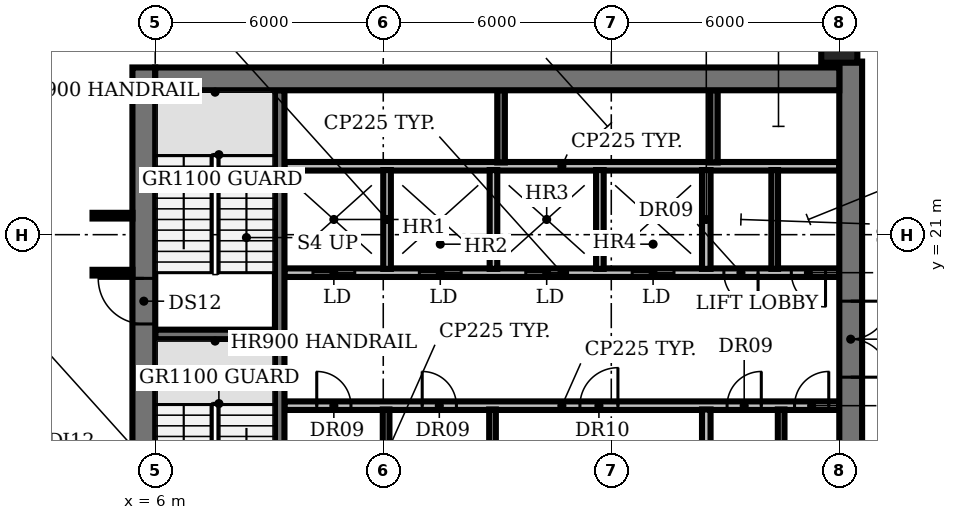
"""IFC4 building model, lengths in metres.
Left out: names, types, materials, properties, quantities, classifications, styles, units other than length and angle.
Written with IfcOpenShell. Run it as: python <this file> out.ifc"""

import sys

from ifc_helpers import new_model, si_unit, direction, frame, frame_2d, origin, origin_2d, place, context, subcontext, project, spatial, rectangle, circle, extrude, element, fill, save


model = new_model("IFC4")
c1 = context("Model", 3, precision=1e-05, world=origin(), true_north=direction((0.0, 1.0)))
c2 = subcontext(c1, "Body", "Model", "MODEL_VIEW")
j1 = project(units=[si_unit("LENGTHUNIT", "METRE"), si_unit("PLANEANGLEUNIT", "RADIAN")], contexts=[c1])
p1 = place(None, origin())
s1 = spatial("IfcSite", under=j1, at=p1, CompositionType="ELEMENT")
p2 = place(p1, origin())
s2 = spatial("IfcBuilding", under=s1, at=p2, CompositionType="ELEMENT")
p3 = place(p2, frame((0.0, 0.0, 159.2)))
s3 = spatial("IfcBuildingStorey", under=s2, at=p3, CompositionType="ELEMENT", Elevation=159.2)
p4 = place(p3, frame((24.0, 26.0, 0.0), z_axis=(0.0, 0.0, 1.0), x_axis=(1.0, 0.0, 0.0)))
e1 = element("IfcColumn", 1, at=p4, inside=s3, PredefinedType="COLUMN", context=c2, shape_type="SweptSolid", body=[
    extrude(circle(Radius=0.475, at=origin_2d()), origin(), (0.0, 0.0, 1.0), 3.85),
])
p5 = place(p3, frame((9.4, 16.5, 0.0), z_axis=(0.0, 0.0, 1.0), x_axis=(1.0, 0.0, 0.0)))
e2 = element("IfcWall", 2, at=p5, inside=s3, PredefinedType="PARTITIONING", context=c2, shape_type="SweptSolid", body=[
    extrude(rectangle(XDim=14.6, YDim=0.225, at=frame_2d((7.3, 0.0))), origin(), (0.0, 0.0, 1.0), 3.85),
])
p6 = place(p5, frame((0.85, 0.0, 0.0)))
e3 = element("IfcOpeningElement", 3, at=p6, cuts=e2, PredefinedType="OPENING", context=c2, shape_type="SweptSolid", body=[
    extrude(rectangle(XDim=0.9, YDim=2.1, at=frame_2d((0.45, 1.05))), frame((0.0, 0.123, 0.0), z_axis=(0.0, -1.0, 0.0), x_axis=(1.0, 0.0, 0.0)), (0.0, 0.0, 1.0), 0.245),
])
p7 = place(p5, frame((3.625, 0.0, 0.0)))
e4 = element("IfcOpeningElement", 4, at=p7, cuts=e2, PredefinedType="OPENING", context=c2, shape_type="SweptSolid", body=[
    extrude(rectangle(XDim=0.9, YDim=2.1, at=frame_2d((0.45, 1.05))), frame((0.0, 0.123, 0.0), z_axis=(0.0, -1.0, 0.0), x_axis=(1.0, 0.0, 0.0)), (0.0, 0.0, 1.0), 0.245),
])
p8 = place(p5, frame((7.775, 0.0, 0.0)))
e5 = element("IfcOpeningElement", 5, at=p8, cuts=e2, PredefinedType="OPENING", context=c2, shape_type="SweptSolid", body=[
    extrude(rectangle(XDim=1.0, YDim=2.1, at=frame_2d((0.5, 1.05))), frame((0.0, 0.123, 0.0), z_axis=(0.0, -1.0, 0.0), x_axis=(1.0, 0.0, 0.0)), (0.0, 0.0, 1.0), 0.245),
])
p9 = place(p5, frame((11.647, 0.0, 0.0)))
e6 = element("IfcOpeningElement", 6, at=p9, cuts=e2, PredefinedType="OPENING", context=c2, shape_type="SweptSolid", body=[
    extrude(rectangle(XDim=0.9, YDim=2.1, at=frame_2d((0.45, 1.05))), frame((0.0, 0.123, 0.0), z_axis=(0.0, -1.0, 0.0), x_axis=(1.0, 0.0, 0.0)), (0.0, 0.0, 1.0), 0.245),
])
p10 = place(p5, frame((13.423, 0.0, 0.0)))
e7 = element("IfcOpeningElement", 7, at=p10, cuts=e2, PredefinedType="OPENING", context=c2, shape_type="SweptSolid", body=[
    extrude(rectangle(XDim=0.9, YDim=2.1, at=frame_2d((0.45, 1.05))), frame((0.0, 0.123, 0.0), z_axis=(0.0, -1.0, 0.0), x_axis=(1.0, 0.0, 0.0)), (0.0, 0.0, 1.0), 0.245),
])
p11 = place(p3, frame((6.0, 18.375, 0.0), z_axis=(0.0, 0.0, 1.0), x_axis=(1.0, 0.0, 0.0)))
e8 = element("IfcWall", 8, at=p11, inside=s3, PredefinedType="SHEAR", context=c2, shape_type="SweptSolid", body=[
    extrude(rectangle(XDim=3.15, YDim=0.25, at=frame_2d((1.575, 0.0))), origin(), (0.0, 0.0, 1.0), 3.85),
])
p12 = place(p3, frame((24.0, 20.0, 0.0), z_axis=(0.0, 0.0, 1.0), x_axis=(-1.0, 0.0, 0.0)))
e9 = element("IfcWall", 9, at=p12, inside=s3, PredefinedType="PARTITIONING", context=c2, shape_type="SweptSolid", body=[
    extrude(rectangle(XDim=14.6, YDim=0.225, at=frame_2d((7.3, 0.0))), origin(), (0.0, 0.0, 1.0), 3.85),
])
p13 = place(p12, frame((12.75, 0.0, 0.0)))
e10 = element("IfcOpeningElement", 10, at=p13, cuts=e9, PredefinedType="OPENING", context=c2, shape_type="SweptSolid", body=[
    extrude(rectangle(XDim=1.1, YDim=2.1, at=frame_2d((0.55, 1.05))), frame((0.0, 0.123, 0.0), z_axis=(0.0, -1.0, 0.0), x_axis=(1.0, 0.0, 0.0)), (0.0, 0.0, 1.0), 0.245),
])
p14 = place(p12, frame((9.95, 0.0, 0.0)))
e11 = element("IfcOpeningElement", 11, at=p14, cuts=e9, PredefinedType="OPENING", context=c2, shape_type="SweptSolid", body=[
    extrude(rectangle(XDim=1.1, YDim=2.1, at=frame_2d((0.55, 1.05))), frame((0.0, 0.123, 0.0), z_axis=(0.0, -1.0, 0.0), x_axis=(1.0, 0.0, 0.0)), (0.0, 0.0, 1.0), 0.245),
])
p15 = place(p12, frame((7.15, 0.0, 0.0)))
e12 = element("IfcOpeningElement", 12, at=p15, cuts=e9, PredefinedType="OPENING", context=c2, shape_type="SweptSolid", body=[
    extrude(rectangle(XDim=1.1, YDim=2.1, at=frame_2d((0.55, 1.05))), frame((0.0, 0.123, 0.0), z_axis=(0.0, -1.0, 0.0), x_axis=(1.0, 0.0, 0.0)), (0.0, 0.0, 1.0), 0.245),
])
p16 = place(p12, frame((4.35, 0.0, 0.0)))
e13 = element("IfcOpeningElement", 13, at=p16, cuts=e9, PredefinedType="OPENING", context=c2, shape_type="SweptSolid", body=[
    extrude(rectangle(XDim=1.1, YDim=2.1, at=frame_2d((0.55, 1.05))), frame((0.0, 0.123, 0.0), z_axis=(0.0, -1.0, 0.0), x_axis=(1.0, 0.0, 0.0)), (0.0, 0.0, 1.0), 0.245),
])
p17 = place(p12, frame((2.137, 0.0, 0.0)))
e14 = element("IfcOpeningElement", 14, at=p17, cuts=e9, PredefinedType="OPENING", context=c2, shape_type="SweptSolid", body=[
    extrude(rectangle(XDim=0.9, YDim=2.1, at=frame_2d((0.45, 1.05))), frame((0.0, 0.123, 0.0), z_axis=(0.0, -1.0, 0.0), x_axis=(1.0, 0.0, 0.0)), (0.0, 0.0, 1.0), 0.245),
])
p18 = place(p12, frame((0.363, 0.0, 0.0)))
e15 = element("IfcOpeningElement", 15, at=p18, cuts=e9, PredefinedType="OPENING", context=c2, shape_type="SweptSolid", body=[
    extrude(rectangle(XDim=0.9, YDim=2.1, at=frame_2d((0.45, 1.05))), frame((0.0, 0.123, 0.0), z_axis=(0.0, -1.0, 0.0), x_axis=(1.0, 0.0, 0.0)), (0.0, 0.0, 1.0), 0.245),
])
p19 = place(p3, frame((9.4, 22.8, 0.0), z_axis=(0.0, 0.0, 1.0), x_axis=(1.0, 0.0, 0.0)))
e16 = element("IfcWall", 16, at=p19, inside=s3, PredefinedType="PARTITIONING", context=c2, shape_type="SweptSolid", body=[
    extrude(rectangle(XDim=14.6, YDim=0.225, at=frame_2d((7.3, 0.0))), origin(), (0.0, 0.0, 1.0), 3.85),
])
p20 = place(p3, frame((9.275, 18.375, 0.0), z_axis=(0.0, 0.0, 1.0), x_axis=(0.0, -1.0, 0.0)))
e17 = element("IfcWall", 17, at=p20, inside=s3, PredefinedType="SHEAR", context=c2, shape_type="SweptSolid", body=[
    extrude(rectangle(XDim=6.55, YDim=0.25, at=frame_2d((3.275, 0.0))), origin(), (0.0, 0.0, 1.0), 3.85),
])
p21 = place(p20, frame((5.075, 0.0, 0.0)))
e18 = element("IfcOpeningElement", 18, at=p21, cuts=e17, PredefinedType="OPENING", context=c2, shape_type="SweptSolid", body=[
    extrude(rectangle(XDim=1.0, YDim=2.1, at=frame_2d((0.5, 1.05))), frame((0.0, 0.135, 0.0), z_axis=(0.0, -1.0, 0.0), x_axis=(1.0, 0.0, 0.0)), (0.0, 0.0, 1.0), 0.27),
])
p22 = place(p3, frame((9.275, 18.375, 0.0), z_axis=(0.0, 0.0, 1.0), x_axis=(0.0, 1.0, 0.0)))
e19 = element("IfcWall", 19, at=p22, inside=s3, PredefinedType="SHEAR", context=c2, shape_type="SweptSolid", body=[
    extrude(rectangle(XDim=6.425, YDim=0.25, at=frame_2d((3.212, 0.0))), origin(), (0.0, 0.0, 1.0), 3.85),
])
p23 = place(p3, frame((12.075, 13.8, 0.0), z_axis=(0.0, 0.0, 1.0), x_axis=(0.0, 1.0, 0.0)))
e20 = element("IfcWall", 20, at=p23, inside=s3, PredefinedType="PARTITIONING", context=c2, shape_type="SweptSolid", body=[
    extrude(rectangle(XDim=2.6, YDim=0.175, at=frame_2d((1.3, 0.0))), origin(), (0.0, 0.0, 1.0), 3.85),
])
p24 = place(p3, frame((12.1, 20.1, 0.0), z_axis=(0.0, 0.0, 1.0), x_axis=(0.0, 1.0, 0.0)))
e21 = element("IfcWall", 21, at=p24, inside=s3, PredefinedType="SOLIDWALL", context=c2, shape_type="SweptSolid", body=[
    extrude(rectangle(XDim=2.6, YDim=0.2, at=frame_2d((1.3, 0.0))), origin(), (0.0, 0.0, 1.0), 3.85),
])
p25 = place(p3, frame((14.875, 13.8, 0.0), z_axis=(0.0, 0.0, 1.0), x_axis=(0.0, 1.0, 0.0)))
e22 = element("IfcWall", 22, at=p25, inside=s3, PredefinedType="PARTITIONING", context=c2, shape_type="SweptSolid", body=[
    extrude(rectangle(XDim=2.6, YDim=0.175, at=frame_2d((1.3, 0.0))), origin(), (0.0, 0.0, 1.0), 3.85),
])
p26 = place(p3, frame((14.9, 20.1, 0.0), z_axis=(0.0, 0.0, 1.0), x_axis=(0.0, 1.0, 0.0)))
e23 = element("IfcWall", 23, at=p26, inside=s3, PredefinedType="SOLIDWALL", context=c2, shape_type="SweptSolid", body=[
    extrude(rectangle(XDim=2.6, YDim=0.2, at=frame_2d((1.3, 0.0))), origin(), (0.0, 0.0, 1.0), 3.85),
])
p27 = place(p3, frame((15.1, 22.9, 0.0), z_axis=(0.0, 0.0, 1.0), x_axis=(0.0, 1.0, 0.0)))
e24 = element("IfcWall", 24, at=p27, inside=s3, PredefinedType="SHEAR", context=c2, shape_type="SweptSolid", body=[
    extrude(rectangle(XDim=1.9, YDim=0.2, at=frame_2d((0.95, 0.0))), origin(), (0.0, 0.0, 1.0), 3.85),
])
p28 = place(p3, frame((17.7, 20.1, 0.0), z_axis=(0.0, 0.0, 1.0), x_axis=(0.0, 1.0, 0.0)))
e25 = element("IfcWall", 25, at=p28, inside=s3, PredefinedType="SOLIDWALL", context=c2, shape_type="SweptSolid", body=[
    extrude(rectangle(XDim=2.6, YDim=0.2, at=frame_2d((1.3, 0.0))), origin(), (0.0, 0.0, 1.0), 3.85),
])
for number, where, z_axis, x_axis in (
    (26, (20.5, 13.8, 0.0), (0.0, 0.0, 1.0), (0.0, 1.0, 0.0)),
    (27, (20.5, 20.1, 0.0), (0.0, 0.0, 1.0), (0.0, 1.0, 0.0)),
):
    element("IfcWall", number, at=place(p3, frame(where, z_axis=z_axis, x_axis=x_axis)), inside=s3, PredefinedType="PARTITIONING", context=c2, shape_type="SweptSolid", body=[
        extrude(rectangle(XDim=2.6, YDim=0.225, at=frame_2d((1.3, 0.0))), origin(), (0.0, 0.0, 1.0), 3.85),
    ])
p29 = place(p3, frame((20.7, 22.9, 0.0), z_axis=(0.0, 0.0, 1.0), x_axis=(0.0, 1.0, 0.0)))
e28 = element("IfcWall", 28, at=p29, inside=s3, PredefinedType="SHEAR", context=c2, shape_type="SweptSolid", body=[
    extrude(rectangle(XDim=1.9, YDim=0.2, at=frame_2d((0.95, 0.0))), origin(), (0.0, 0.0, 1.0), 3.85),
])
for number, where, z_axis, x_axis in (
    (29, (22.3, 20.1, 0.0), (0.0, 0.0, 1.0), (0.0, 1.0, 0.0)),
    (30, (22.47, 13.8, 0.0), (0.0, 0.0, 1.0), (0.0, 1.0, 0.0)),
):
    element("IfcWall", number, at=place(p3, frame(where, z_axis=z_axis, x_axis=x_axis)), inside=s3, PredefinedType="PARTITIONING", context=c2, shape_type="SweptSolid", body=[
        extrude(rectangle(XDim=2.6, YDim=0.175, at=frame_2d((1.3, 0.0))), origin(), (0.0, 0.0, 1.0), 3.85),
    ])
p30 = place(p3, frame((5.7, 4.8, 0.0), z_axis=(0.0, 0.0, 1.0), x_axis=(0.0, 1.0, 0.0)))
e31 = element("IfcWall", 31, at=p30, inside=s3, PredefinedType="SHEAR", context=c2, shape_type="SweptSolid", body=[
    extrude(rectangle(XDim=20.6, YDim=0.6, at=frame_2d((10.3, 0.0))), origin(), (0.0, 0.0, 1.0), 3.85),
])
p31 = place(p30, frame((0.85, 0.0, 0.0)))
e32 = element("IfcOpeningElement", 32, at=p31, cuts=e31, PredefinedType="OPENING", context=c2, shape_type="SweptSolid", body=[
    extrude(rectangle(XDim=1.5, YDim=2.1, at=frame_2d((0.75, 1.05))), frame((0.0, 0.31, 0.0), z_axis=(0.0, -1.0, 0.0), x_axis=(1.0, 0.0, 0.0)), (0.0, 0.0, 1.0), 0.62),
])
p32 = place(p30, frame((7.3, 0.0, 0.0)))
e33 = element("IfcOpeningElement", 33, at=p32, cuts=e31, PredefinedType="OPENING", context=c2, shape_type="SweptSolid", body=[
    extrude(rectangle(XDim=1.2, YDim=2.1, at=frame_2d((0.6, 1.05))), frame((0.0, 0.31, 0.0), z_axis=(0.0, -1.0, 0.0), x_axis=(1.0, 0.0, 0.0)), (0.0, 0.0, 1.0), 0.62),
])
p33 = place(p30, frame((13.85, 0.0, 0.0)))
e34 = element("IfcOpeningElement", 34, at=p33, cuts=e31, PredefinedType="OPENING", context=c2, shape_type="SweptSolid", body=[
    extrude(rectangle(XDim=1.2, YDim=2.1, at=frame_2d((0.6, 1.05))), frame((0.0, 0.31, 0.0), z_axis=(0.0, -1.0, 0.0), x_axis=(1.0, 0.0, 0.0)), (0.0, 0.0, 1.0), 0.62),
])
p34 = place(p3, frame((24.3, 25.555, 0.0), z_axis=(0.0, 0.0, 1.0), x_axis=(0.0, -1.0, 0.0)))
e35 = element("IfcWall", 35, at=p34, inside=s3, PredefinedType="SHEAR", context=c2, shape_type="SweptSolid", body=[
    extrude(rectangle(XDim=20.755, YDim=0.6, at=frame_2d((10.377, 0.0))), origin(), (0.0, 0.0, 1.0), 3.85),
])
p35 = place(p34, frame((18.405, 0.0, 0.0)))
e36 = element("IfcOpeningElement", 36, at=p35, cuts=e35, PredefinedType="OPENING", context=c2, shape_type="SweptSolid", body=[
    extrude(rectangle(XDim=1.5, YDim=2.1, at=frame_2d((0.75, 1.05))), frame((0.0, 0.31, 0.0), z_axis=(0.0, -1.0, 0.0), x_axis=(1.0, 0.0, 0.0)), (0.0, 0.0, 1.0), 0.62),
])
p36 = place(p34, frame((12.305, 0.0, 0.0)))
e37 = element("IfcOpeningElement", 37, at=p36, cuts=e35, PredefinedType="OPENING", context=c2, shape_type="SweptSolid", body=[
    extrude(rectangle(XDim=0.9, YDim=2.1, at=frame_2d((0.45, 1.05))), frame((0.0, 0.31, 0.0), z_axis=(0.0, -1.0, 0.0), x_axis=(1.0, 0.0, 0.0)), (0.0, 0.0, 1.0), 0.62),
])
p37 = place(p34, frame((6.305, 0.0, 0.0)))
e38 = element("IfcOpeningElement", 38, at=p37, cuts=e35, PredefinedType="OPENING", context=c2, shape_type="SweptSolid", body=[
    extrude(rectangle(XDim=2.0, YDim=2.1, at=frame_2d((1.0, 1.05))), frame((0.0, 0.31, 0.0), z_axis=(0.0, -1.0, 0.0), x_axis=(1.0, 0.0, 0.0)), (0.0, 0.0, 1.0), 0.62),
])
p38 = place(p3, frame((6.0, 25.1, 0.0), z_axis=(0.0, 0.0, 1.0), x_axis=(1.0, 0.0, 0.0)))
e39 = element("IfcWall", 39, at=p38, inside=s3, PredefinedType="SHEAR", context=c2, shape_type="SweptSolid", body=[
    extrude(rectangle(XDim=18.0, YDim=0.6, at=frame_2d((9.0, 0.0))), origin(), (0.0, 0.0, 1.0), 3.85),
])
for number, where, z_axis, x_axis in (
    (40, (4.35, 20.0, 0.0), (0.0, 0.0, 1.0), (1.0, 0.0, 0.0)),
    (41, (4.35, 21.5, 0.0), (0.0, 0.0, 1.0), (1.0, 0.0, 0.0)),
):
    element("IfcWall", number, at=place(p3, frame(where, z_axis=z_axis, x_axis=x_axis)), inside=s3, PredefinedType="PARTITIONING", context=c2, shape_type="SweptSolid", body=[
        extrude(rectangle(XDim=1.05, YDim=0.15, at=frame_2d((0.525, 0.0))), origin(), (0.0, 0.0, 1.0), 2.88),
    ])
p39 = place(p6, origin())
e42 = element("IfcDoor", 42, at=p39, inside=s3, OperationType="SINGLE_SWING_LEFT", PredefinedType="DOOR", context=c2, shape_type="SweptSolid", body=[
    extrude(rectangle(XDim=0.9, YDim=2.1, at=frame_2d((0.45, 1.05))), frame((0.0, 0.025, 0.0), z_axis=(0.0, -1.0, 0.0), x_axis=(1.0, 0.0, 0.0)), (0.0, 0.0, 1.0), 0.05),
])
fill(e3, e42)
p40 = place(p7, origin())
e43 = element("IfcDoor", 43, at=p40, inside=s3, OperationType="SINGLE_SWING_LEFT", PredefinedType="DOOR", context=c2, shape_type="SweptSolid", body=[
    extrude(rectangle(XDim=0.9, YDim=2.1, at=frame_2d((0.45, 1.05))), frame((0.0, 0.025, 0.0), z_axis=(0.0, -1.0, 0.0), x_axis=(1.0, 0.0, 0.0)), (0.0, 0.0, 1.0), 0.05),
])
fill(e4, e43)
p41 = place(p8, origin())
e44 = element("IfcDoor", 44, at=p41, inside=s3, OperationType="SINGLE_SWING_RIGHT", PredefinedType="DOOR", context=c2, shape_type="SweptSolid", body=[
    extrude(rectangle(XDim=1.0, YDim=2.1, at=frame_2d((0.5, 1.05))), frame((0.0, 0.025, 0.0), z_axis=(0.0, -1.0, 0.0), x_axis=(1.0, 0.0, 0.0)), (0.0, 0.0, 1.0), 0.05),
])
fill(e5, e44)
p42 = place(p9, origin())
e45 = element("IfcDoor", 45, at=p42, inside=s3, OperationType="SINGLE_SWING_RIGHT", PredefinedType="DOOR", context=c2, shape_type="SweptSolid", body=[
    extrude(rectangle(XDim=0.9, YDim=2.1, at=frame_2d((0.45, 1.05))), frame((0.0, 0.025, 0.0), z_axis=(0.0, -1.0, 0.0), x_axis=(1.0, 0.0, 0.0)), (0.0, 0.0, 1.0), 0.05),
])
fill(e6, e45)
p43 = place(p10, origin())
e46 = element("IfcDoor", 46, at=p43, inside=s3, OperationType="SINGLE_SWING_RIGHT", PredefinedType="DOOR", context=c2, shape_type="SweptSolid", body=[
    extrude(rectangle(XDim=0.9, YDim=2.1, at=frame_2d((0.45, 1.05))), frame((0.0, 0.025, 0.0), z_axis=(0.0, -1.0, 0.0), x_axis=(1.0, 0.0, 0.0)), (0.0, 0.0, 1.0), 0.05),
])
fill(e7, e46)
p44 = place(p13, origin())
e47 = element("IfcDoor", 47, at=p44, inside=s3, OperationType="DOUBLE_DOOR_SLIDING", PredefinedType="DOOR", context=c2, shape_type="SweptSolid", body=[
    extrude(rectangle(XDim=1.1, YDim=2.1, at=frame_2d((0.55, 1.05))), frame((0.0, 0.025, 0.0), z_axis=(0.0, -1.0, 0.0), x_axis=(1.0, 0.0, 0.0)), (0.0, 0.0, 1.0), 0.05),
])
fill(e10, e47)
p45 = place(p14, origin())
e48 = element("IfcDoor", 48, at=p45, inside=s3, OperationType="DOUBLE_DOOR_SLIDING", PredefinedType="DOOR", context=c2, shape_type="SweptSolid", body=[
    extrude(rectangle(XDim=1.1, YDim=2.1, at=frame_2d((0.55, 1.05))), frame((0.0, 0.025, 0.0), z_axis=(0.0, -1.0, 0.0), x_axis=(1.0, 0.0, 0.0)), (0.0, 0.0, 1.0), 0.05),
])
fill(e11, e48)
p46 = place(p15, origin())
e49 = element("IfcDoor", 49, at=p46, inside=s3, OperationType="DOUBLE_DOOR_SLIDING", PredefinedType="DOOR", context=c2, shape_type="SweptSolid", body=[
    extrude(rectangle(XDim=1.1, YDim=2.1, at=frame_2d((0.55, 1.05))), frame((0.0, 0.025, 0.0), z_axis=(0.0, -1.0, 0.0), x_axis=(1.0, 0.0, 0.0)), (0.0, 0.0, 1.0), 0.05),
])
fill(e12, e49)
p47 = place(p16, origin())
e50 = element("IfcDoor", 50, at=p47, inside=s3, OperationType="DOUBLE_DOOR_SLIDING", PredefinedType="DOOR", context=c2, shape_type="SweptSolid", body=[
    extrude(rectangle(XDim=1.1, YDim=2.1, at=frame_2d((0.55, 1.05))), frame((0.0, 0.025, 0.0), z_axis=(0.0, -1.0, 0.0), x_axis=(1.0, 0.0, 0.0)), (0.0, 0.0, 1.0), 0.05),
])
fill(e13, e50)
p48 = place(p17, origin())
e51 = element("IfcDoor", 51, at=p48, inside=s3, OperationType="SINGLE_SWING_LEFT", PredefinedType="DOOR", context=c2, shape_type="SweptSolid", body=[
    extrude(rectangle(XDim=0.9, YDim=2.1, at=frame_2d((0.45, 1.05))), frame((0.0, 0.025, 0.0), z_axis=(0.0, -1.0, 0.0), x_axis=(1.0, 0.0, 0.0)), (0.0, 0.0, 1.0), 0.05),
])
fill(e14, e51)
p49 = place(p18, origin())
e52 = element("IfcDoor", 52, at=p49, inside=s3, OperationType="SINGLE_SWING_LEFT", PredefinedType="DOOR", context=c2, shape_type="SweptSolid", body=[
    extrude(rectangle(XDim=0.9, YDim=2.1, at=frame_2d((0.45, 1.05))), frame((0.0, 0.025, 0.0), z_axis=(0.0, -1.0, 0.0), x_axis=(1.0, 0.0, 0.0)), (0.0, 0.0, 1.0), 0.05),
])
fill(e15, e52)
p50 = place(p33, origin())
e53 = element("IfcDoor", 53, at=p50, inside=s3, OperationType="SINGLE_SWING_RIGHT", PredefinedType="DOOR", context=c2, shape_type="SweptSolid", body=[
    extrude(rectangle(XDim=1.2, YDim=2.1, at=frame_2d((0.6, 1.05))), frame((0.0, 0.025, 0.0), z_axis=(0.0, -1.0, 0.0), x_axis=(1.0, 0.0, 0.0)), (0.0, 0.0, 1.0), 0.05),
])
fill(e34, e53)
p51 = place(p37, origin())
e54 = element("IfcDoor", 54, at=p51, inside=s3, OperationType="DOUBLE_DOOR_SINGLE_SWING", PredefinedType="DOOR", context=c2, shape_type="SweptSolid", body=[
    extrude(rectangle(XDim=2.0, YDim=2.1, at=frame_2d((1.0, 1.05))), frame((0.0, 0.025, 0.0), z_axis=(0.0, -1.0, 0.0), x_axis=(1.0, 0.0, 0.0)), (0.0, 0.0, 1.0), 0.05),
])
fill(e38, e54)
save(model, sys.argv[1])
